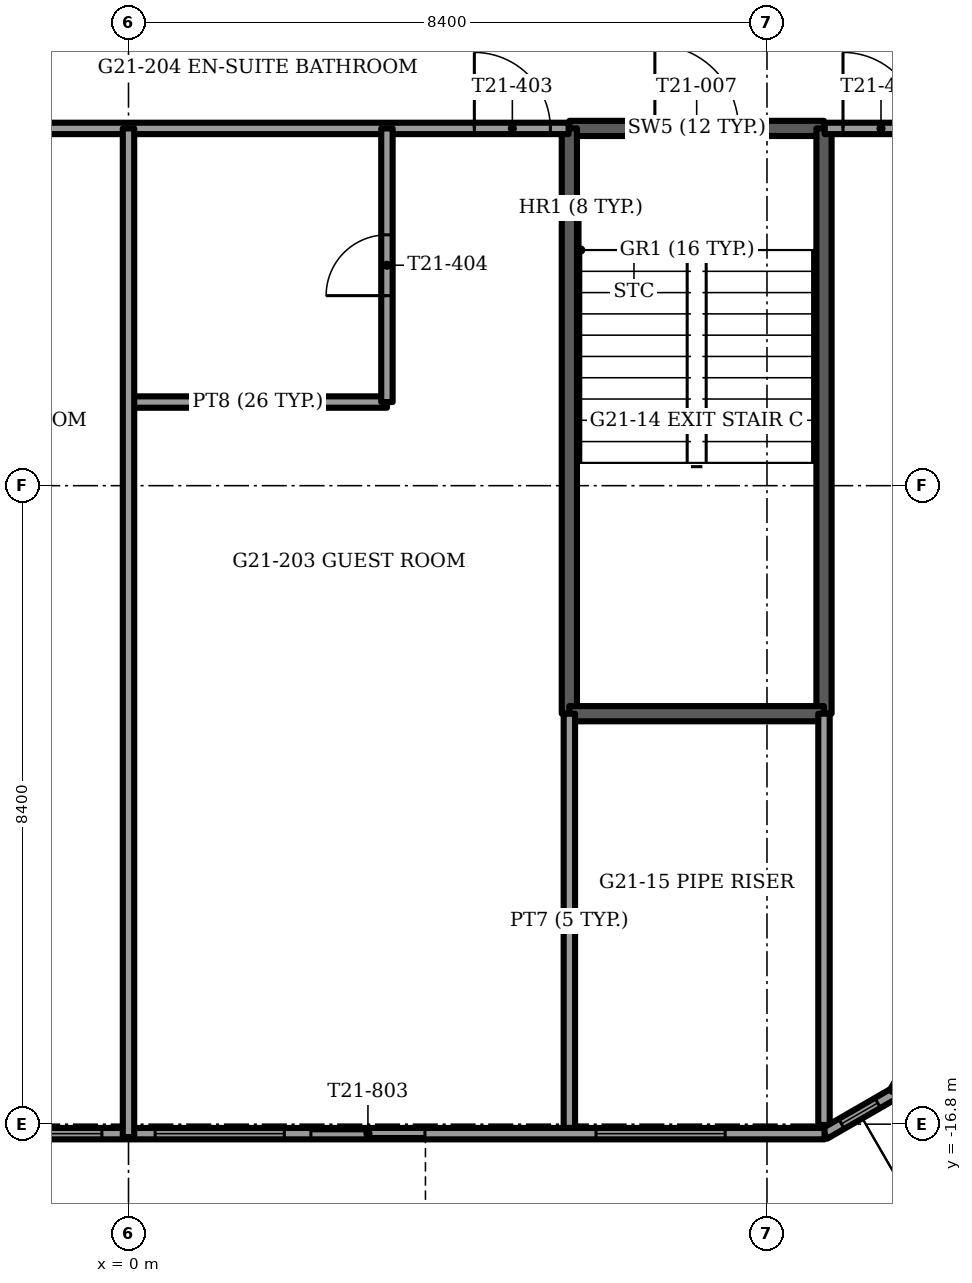
"""IFC4 building model, lengths in metres.
Left out: names, types, materials, properties, quantities, classifications, styles, units other than length and angle.
Written with IfcOpenShell. Run it as: python <this file> out.ifc"""

import sys

from ifc_helpers import new_model, si_unit, direction, frame, frame_2d, origin, place, context, subcontext, project, spatial, rectangle, extrude, element, fill, save


model = new_model("IFC4")
c1 = context("Model", 3, precision=1e-05, world=origin(), true_north=direction((0.0, 1.0)))
c2 = subcontext(c1, "Body", "Model", "MODEL_VIEW")
j1 = project(units=[si_unit("LENGTHUNIT", "METRE"), si_unit("PLANEANGLEUNIT", "RADIAN")], contexts=[c1])
p1 = place(None, origin())
s1 = spatial("IfcSite", under=j1, at=p1, CompositionType="ELEMENT")
p2 = place(p1, origin())
s2 = spatial("IfcBuilding", under=s1, at=p2, CompositionType="ELEMENT")
p3 = place(p2, frame((0.0, 0.0, 85.5)))
s3 = spatial("IfcBuildingStorey", under=s2, at=p3, CompositionType="ELEMENT", Elevation=85.5)
p4 = place(p3, frame((-9.157, -16.925, 0.0), z_axis=(0.0, 0.0, 1.0), x_axis=(1.0, 0.0, 0.0)))
e1 = element("IfcWall", 1, at=p4, inside=s3, PredefinedType="SOLIDWALL", context=c2, shape_type="SweptSolid", body=[
    extrude(rectangle(XDim=18.313, YDim=0.15, at=frame_2d((9.157, 0.0))), origin(), (0.0, 0.0, 1.0), 3.45),
])
p5 = place(p4, frame((3.707, 0.0, 0.15)))
e2 = element("IfcOpeningElement", 2, at=p5, cuts=e1, PredefinedType="OPENING", context=c2, shape_type="SweptSolid", body=[
    extrude(rectangle(XDim=0.9, YDim=2.85, at=frame_2d((0.45, 1.425))), frame((0.0, 0.075, 0.0), z_axis=(0.0, -1.0, 0.0), x_axis=(1.0, 0.0, 0.0)), (0.0, 0.0, 1.0), 0.15),
])
p6 = place(p4, frame((1.507, 0.0, 0.15)))
e3 = element("IfcOpeningElement", 3, at=p6, cuts=e1, PredefinedType="OPENING", context=c2, shape_type="SweptSolid", body=[
    extrude(rectangle(XDim=1.5, YDim=2.85, at=frame_2d((0.75, 1.425))), frame((0.0, 0.075, 0.0), z_axis=(0.0, -1.0, 0.0), x_axis=(1.0, 0.0, 0.0)), (0.0, 0.0, 1.0), 0.15),
])
p7 = place(p4, frame((5.257, 0.0, 0.15)))
e4 = element("IfcOpeningElement", 4, at=p7, cuts=e1, PredefinedType="OPENING", context=c2, shape_type="SweptSolid", body=[
    extrude(rectangle(XDim=1.7, YDim=2.85, at=frame_2d((0.85, 1.425))), frame((0.0, 0.075, 0.0), z_axis=(0.0, -1.0, 0.0), x_axis=(1.0, 0.0, 0.0)), (0.0, 0.0, 1.0), 0.15),
])
p8 = place(p4, frame((7.307, 0.0, 0.15)))
e5 = element("IfcOpeningElement", 5, at=p8, cuts=e1, PredefinedType="OPENING", context=c2, shape_type="SweptSolid", body=[
    extrude(rectangle(XDim=1.5, YDim=2.85, at=frame_2d((0.75, 1.425))), frame((0.0, 0.075, 0.0), z_axis=(0.0, -1.0, 0.0), x_axis=(1.0, 0.0, 0.0)), (0.0, 0.0, 1.0), 0.15),
])
p9 = place(p4, frame((9.507, 0.0, 0.15)))
e6 = element("IfcOpeningElement", 6, at=p9, cuts=e1, PredefinedType="OPENING", context=c2, shape_type="SweptSolid", body=[
    extrude(rectangle(XDim=1.7, YDim=2.85, at=frame_2d((0.85, 1.425))), frame((0.0, 0.075, 0.0), z_axis=(0.0, -1.0, 0.0), x_axis=(1.0, 0.0, 0.0)), (0.0, 0.0, 1.0), 0.15),
])
p10 = place(p4, frame((11.557, 0.0, 0.0)))
e7 = element("IfcOpeningElement", 7, at=p10, cuts=e1, PredefinedType="OPENING", context=c2, shape_type="SweptSolid", body=[
    extrude(rectangle(XDim=1.5, YDim=2.4, at=frame_2d((0.75, 1.2))), frame((0.0, 0.075, 0.0), z_axis=(0.0, -1.0, 0.0), x_axis=(1.0, 0.0, 0.0)), (0.0, 0.0, 1.0), 0.15),
])
p11 = place(p4, frame((15.307, 0.0, 0.15)))
e8 = element("IfcOpeningElement", 8, at=p11, cuts=e1, PredefinedType="OPENING", context=c2, shape_type="SweptSolid", body=[
    extrude(rectangle(XDim=1.7, YDim=2.85, at=frame_2d((0.85, 1.425))), frame((0.0, 0.075, 0.0), z_axis=(0.0, -1.0, 0.0), x_axis=(1.0, 0.0, 0.0)), (0.0, 0.0, 1.0), 0.15),
])
p12 = place(p3, frame((10.079, -16.393, 0.0), z_axis=(0.0, 0.0, 1.0), x_axis=(0.499995945303, 0.866027744752, 0.0)))
e9 = element("IfcWall", 9, at=p12, inside=s3, PredefinedType="SOLIDWALL", context=c2, shape_type="SweptSolid", body=[
    extrude(rectangle(XDim=18.314, YDim=0.15, at=frame_2d((9.157, 0.0))), origin(), (0.0, 0.0, 1.0), 3.45),
])
p13 = place(p12, frame((3.157, 0.0, 0.15)))
e10 = element("IfcOpeningElement", 10, at=p13, cuts=e9, PredefinedType="OPENING", context=c2, shape_type="SweptSolid", body=[
    extrude(rectangle(XDim=1.7, YDim=2.85, at=frame_2d((0.85, 1.425))), frame((0.0, 0.075, 0.0), z_axis=(0.0, -1.0, 0.0), x_axis=(1.0, 0.0, 0.0)), (0.0, 0.0, 1.0), 0.15),
])
p14 = place(p12, frame((5.257, 0.0, 0.0)))
e11 = element("IfcOpeningElement", 11, at=p14, cuts=e9, PredefinedType="OPENING", context=c2, shape_type="SweptSolid", body=[
    extrude(rectangle(XDim=1.5, YDim=2.4, at=frame_2d((0.75, 1.2))), frame((0.0, 0.075, 0.0), z_axis=(0.0, -1.0, 0.0), x_axis=(1.0, 0.0, 0.0)), (0.0, 0.0, 1.0), 0.15),
])
p15 = place(p12, frame((7.357, 0.0, 0.15)))
e12 = element("IfcOpeningElement", 12, at=p15, cuts=e9, PredefinedType="OPENING", context=c2, shape_type="SweptSolid", body=[
    extrude(rectangle(XDim=1.7, YDim=2.85, at=frame_2d((0.85, 1.425))), frame((0.0, 0.075, 0.0), z_axis=(0.0, -1.0, 0.0), x_axis=(1.0, 0.0, 0.0)), (0.0, 0.0, 1.0), 0.15),
])
p16 = place(p12, frame((9.28, 0.0, 0.0)))
e13 = element("IfcOpeningElement", 13, at=p16, cuts=e9, PredefinedType="OPENING", context=c2, shape_type="SweptSolid", body=[
    extrude(rectangle(XDim=1.5, YDim=2.4, at=frame_2d((0.75, 1.2))), frame((0.0, 0.075, 0.0), z_axis=(0.0, -1.0, 0.0), x_axis=(1.0, 0.0, 0.0)), (0.0, 0.0, 1.0), 0.15),
])
p17 = place(p12, frame((12.832, 0.0, 0.15)))
e14 = element("IfcOpeningElement", 14, at=p17, cuts=e9, PredefinedType="OPENING", context=c2, shape_type="SweptSolid", body=[
    extrude(rectangle(XDim=1.5, YDim=2.85, at=frame_2d((0.75, 1.425))), frame((0.0, 0.075, 0.0), z_axis=(0.0, -1.0, 0.0), x_axis=(1.0, 0.0, 0.0)), (0.0, 0.0, 1.0), 0.15),
])
p18 = place(p12, frame((0.528, 0.0, 0.15)))
e15 = element("IfcOpeningElement", 15, at=p18, cuts=e9, PredefinedType="OPENING", context=c2, shape_type="SweptSolid", body=[
    extrude(rectangle(XDim=1.7, YDim=2.73, at=frame_2d((0.85, 1.365))), frame((0.0, 0.075, 0.0), z_axis=(0.0, -1.0, 0.0), x_axis=(1.0, 0.0, 0.0)), (0.0, 0.0, 1.0), 0.15),
])
p19 = place(p12, frame((15.782, 0.0, 0.15)))
e16 = element("IfcOpeningElement", 16, at=p19, cuts=e9, PredefinedType="OPENING", context=c2, shape_type="SweptSolid", body=[
    extrude(rectangle(XDim=0.9, YDim=2.73, at=frame_2d((0.45, 1.365))), frame((0.0, 0.075, 0.0), z_axis=(0.0, -1.0, 0.0), x_axis=(1.0, 0.0, 0.0)), (0.0, 0.0, 1.0), 0.15),
])
p20 = place(p3, frame((9.157, -16.925, 0.0), z_axis=(0.0, 0.0, 1.0), x_axis=(0.866048165231, 0.499960573946, 0.0)))
e17 = element("IfcWall", 17, at=p20, inside=s3, PredefinedType="SOLIDWALL", context=c2, shape_type="SweptSolid", body=[
    extrude(rectangle(XDim=1.065, YDim=0.15, at=frame_2d((0.532, 0.0))), origin(), (0.0, 0.0, 1.0), 3.45),
])
p21 = place(p20, frame((0.258, 0.0, 0.15)))
e18 = element("IfcOpeningElement", 18, at=p21, cuts=e17, PredefinedType="OPENING", context=c2, shape_type="SweptSolid", body=[
    extrude(rectangle(XDim=0.55, YDim=2.85, at=frame_2d((0.275, 1.425))), frame((0.0, 0.075, 0.0), z_axis=(0.0, -1.0, 0.0), x_axis=(1.0, 0.0, 0.0)), (0.0, 0.0, 1.0), 0.15),
])
p22 = place(p3, frame((5.8, -3.7, -0.3), z_axis=(0.0, 0.0, 1.0), x_axis=(1.0, 0.0, 0.0)))
e19 = element("IfcWall", 19, at=p22, inside=s3, PredefinedType="SOLIDWALL", context=c2, shape_type="SweptSolid", body=[
    extrude(rectangle(XDim=3.35, YDim=0.2, at=frame_2d((1.675, 0.0))), origin(), (0.0, 0.0, 1.0), 3.75),
])
p23 = place(p22, frame((1.125, 0.0, 0.0)))
e20 = element("IfcOpeningElement", 20, at=p23, cuts=e19, PredefinedType="OPENING", context=c2, shape_type="SweptSolid", body=[
    extrude(rectangle(XDim=1.1, YDim=2.1, at=frame_2d((0.55, 1.05))), frame((0.0, 0.1, 0.0), z_axis=(0.0, -1.0, 0.0), x_axis=(1.0, 0.0, 0.0)), (0.0, 0.0, 1.0), 0.2),
])
for number, where, z_axis, x_axis in (
    (21, (5.8, -3.7, -0.3), (0.0, 0.0, 1.0), (0.0, -1.0, 0.0)),
    (22, (9.15, -3.7, -0.3), (0.0, 0.0, 1.0), (0.0, -1.0, 0.0)),
):
    element("IfcWall", number, at=place(p3, frame(where, z_axis=z_axis, x_axis=x_axis)), inside=s3, PredefinedType="SOLIDWALL", context=c2, shape_type="SweptSolid", body=[
        extrude(rectangle(XDim=7.7, YDim=0.2, at=frame_2d((3.85, 0.0))), origin(), (0.0, 0.0, 1.0), 3.75),
    ])
p24 = place(p3, frame((5.8, -11.4, -0.3), z_axis=(0.0, 0.0, 1.0), x_axis=(1.0, 0.0, 0.0)))
e23 = element("IfcWall", 23, at=p24, inside=s3, PredefinedType="SOLIDWALL", context=c2, shape_type="SweptSolid", body=[
    extrude(rectangle(XDim=3.35, YDim=0.2, at=frame_2d((1.675, 0.0))), origin(), (0.0, 0.0, 1.0), 3.75),
])
p25 = place(p3, frame((5.8, -11.4, 0.0), z_axis=(0.0, 0.0, 1.0), x_axis=(0.0, -1.0, 0.0)))
e24 = element("IfcWall", 24, at=p25, inside=s3, PredefinedType="PARTITIONING", context=c2, shape_type="SweptSolid", body=[
    extrude(rectangle(XDim=5.45, YDim=0.15, at=frame_2d((2.725, 0.0))), origin(), (0.0, 0.0, 1.0), 3.45),
])
p26 = place(p3, frame((9.15, -11.4, 0.0), z_axis=(0.0, 0.0, 1.0), x_axis=(0.0, -1.0, 0.0)))
e25 = element("IfcWall", 25, at=p26, inside=s3, PredefinedType="PARTITIONING", context=c2, shape_type="SweptSolid", body=[
    extrude(rectangle(XDim=5.411, YDim=0.15, at=frame_2d((2.706, 0.0))), origin(), (0.0, 0.0, 1.0), 3.45),
])
p27 = place(p3, frame((0.0, -7.3, 0.0), z_axis=(0.0, 0.0, 1.0), x_axis=(1.0, 0.0, 0.0)))
e26 = element("IfcWall", 26, at=p27, inside=s3, PredefinedType="PARTITIONING", context=c2, shape_type="SweptSolid", body=[
    extrude(rectangle(XDim=3.4, YDim=0.15, at=frame_2d((1.7, 0.0))), origin(), (0.0, 0.0, 1.0), 3.45),
])
p28 = place(p3, frame((-5.79, -3.7, 0.0), z_axis=(0.0, 0.0, 1.0), x_axis=(1.0, 0.0, 0.0)))
e27 = element("IfcWall", 27, at=p28, inside=s3, PredefinedType="PARTITIONING", context=c2, shape_type="SweptSolid", body=[
    extrude(rectangle(XDim=11.58, YDim=0.15, at=frame_2d((5.79, 0.0))), origin(), (0.0, 0.0, 1.0), 3.45),
])
p29 = place(p28, frame((2.39, 0.0, 0.0)))
e28 = element("IfcOpeningElement", 28, at=p29, cuts=e27, PredefinedType="OPENING", context=c2, shape_type="SweptSolid", body=[
    extrude(rectangle(XDim=1.0, YDim=2.1, at=frame_2d((0.5, 1.05))), frame((0.0, 0.075, 0.0), z_axis=(0.0, -1.0, 0.0), x_axis=(1.0, 0.0, 0.0)), (0.0, 0.0, 1.0), 0.15),
])
p30 = place(p28, frame((10.34, 0.0, 0.0)))
e29 = element("IfcOpeningElement", 29, at=p30, cuts=e27, PredefinedType="OPENING", context=c2, shape_type="SweptSolid", body=[
    extrude(rectangle(XDim=1.0, YDim=2.1, at=frame_2d((0.5, 1.05))), frame((0.0, 0.075, 0.0), z_axis=(0.0, -1.0, 0.0), x_axis=(1.0, 0.0, 0.0)), (0.0, 0.0, 1.0), 0.15),
])
p31 = place(p3, frame((9.16, -3.7, 0.0), z_axis=(0.0, 0.0, 1.0), x_axis=(1.0, 0.0, 0.0)))
e30 = element("IfcWall", 30, at=p31, inside=s3, PredefinedType="PARTITIONING", context=c2, shape_type="SweptSolid", body=[
    extrude(rectangle(XDim=8.299, YDim=0.15, at=frame_2d((4.149, 0.0))), origin(), (0.0, 0.0, 1.0), 3.45),
])
p32 = place(p31, frame((0.24, 0.0, 0.0)))
e31 = element("IfcOpeningElement", 31, at=p32, cuts=e30, PredefinedType="OPENING", context=c2, shape_type="SweptSolid", body=[
    extrude(rectangle(XDim=1.0, YDim=2.1, at=frame_2d((0.5, 1.05))), frame((0.0, 0.075, 0.0), z_axis=(0.0, -1.0, 0.0), x_axis=(1.0, 0.0, 0.0)), (0.0, 0.0, 1.0), 0.15),
])
p33 = place(p3, frame((3.4, -7.3, 0.0), z_axis=(0.0, 0.0, 1.0), x_axis=(0.0, 1.0, 0.0)))
e32 = element("IfcWall", 32, at=p33, inside=s3, PredefinedType="PARTITIONING", context=c2, shape_type="SweptSolid", body=[
    extrude(rectangle(XDim=3.6, YDim=0.15, at=frame_2d((1.8, 0.0))), origin(), (0.0, 0.0, 1.0), 3.45),
])
p34 = place(p33, frame((1.4, 0.0, 0.0)))
e33 = element("IfcOpeningElement", 33, at=p34, cuts=e32, PredefinedType="OPENING", context=c2, shape_type="SweptSolid", body=[
    extrude(rectangle(XDim=0.8, YDim=2.1, at=frame_2d((0.4, 1.05))), frame((0.0, 0.075, 0.0), z_axis=(0.0, -1.0, 0.0), x_axis=(1.0, 0.0, 0.0)), (0.0, 0.0, 1.0), 0.15),
])
p35 = place(p3, frame((0.0, -16.97, 0.0), z_axis=(0.0, 0.0, 1.0), x_axis=(0.0, 1.0, 0.0)))
e34 = element("IfcWall", 34, at=p35, inside=s3, PredefinedType="PARTITIONING", context=c2, shape_type="SweptSolid", body=[
    extrude(rectangle(XDim=13.27, YDim=0.15, at=frame_2d((6.635, 0.0))), origin(), (0.0, 0.0, 1.0), 3.45),
])
p36 = place(p8, origin())
e35 = element("IfcWindow", 35, at=p36, inside=s3, PartitioningType="SINGLE_PANEL", PredefinedType="WINDOW", context=c2, shape_type="SweptSolid", body=[
    extrude(rectangle(XDim=1.5, YDim=2.85, at=frame_2d((0.75, 1.425))), frame((0.0, 0.03, 0.0), z_axis=(0.0, -1.0, 0.0), x_axis=(1.0, 0.0, 0.0)), (0.0, 0.0, 1.0), 0.06),
])
fill(e5, e35)
p37 = place(p9, origin())
e36 = element("IfcWindow", 36, at=p37, inside=s3, PartitioningType="SINGLE_PANEL", PredefinedType="WINDOW", context=c2, shape_type="SweptSolid", body=[
    extrude(rectangle(XDim=1.7, YDim=2.85, at=frame_2d((0.85, 1.425))), frame((0.0, 0.03, 0.0), z_axis=(0.0, -1.0, 0.0), x_axis=(1.0, 0.0, 0.0)), (0.0, 0.0, 1.0), 0.06),
])
fill(e6, e36)
p38 = place(p10, origin())
e37 = element("IfcDoor", 37, at=p38, inside=s3, OperationType="SLIDING_TO_LEFT", PredefinedType="DOOR", context=c2, shape_type="SweptSolid", body=[
    extrude(rectangle(XDim=1.5, YDim=2.4, at=frame_2d((0.75, 1.2))), frame((0.0, 0.025, 0.0), z_axis=(0.0, -1.0, 0.0), x_axis=(1.0, 0.0, 0.0)), (0.0, 0.0, 1.0), 0.05),
])
fill(e7, e37)
p39 = place(p11, origin())
e38 = element("IfcWindow", 38, at=p39, inside=s3, PartitioningType="SINGLE_PANEL", PredefinedType="WINDOW", context=c2, shape_type="SweptSolid", body=[
    extrude(rectangle(XDim=1.7, YDim=2.85, at=frame_2d((0.85, 1.425))), frame((0.0, 0.03, 0.0), z_axis=(0.0, -1.0, 0.0), x_axis=(1.0, 0.0, 0.0)), (0.0, 0.0, 1.0), 0.06),
])
fill(e8, e38)
p40 = place(p21, origin())
e39 = element("IfcWindow", 39, at=p40, inside=s3, PartitioningType="SINGLE_PANEL", PredefinedType="WINDOW", context=c2, shape_type="SweptSolid", body=[
    extrude(rectangle(XDim=0.55, YDim=2.85, at=frame_2d((0.275, 1.425))), frame((0.0, 0.03, 0.0), z_axis=(0.0, -1.0, 0.0), x_axis=(1.0, 0.0, 0.0)), (0.0, 0.0, 1.0), 0.06),
])
fill(e18, e39)
p41 = place(p23, origin())
e40 = element("IfcDoor", 40, at=p41, inside=s3, OperationType="SINGLE_SWING_LEFT", PredefinedType="DOOR", context=c2, shape_type="SweptSolid", body=[
    extrude(rectangle(XDim=1.1, YDim=2.1, at=frame_2d((0.55, 1.05))), frame((0.0, 0.025, 0.0), z_axis=(0.0, -1.0, 0.0), x_axis=(1.0, 0.0, 0.0)), (0.0, 0.0, 1.0), 0.05),
])
fill(e20, e40)
p42 = place(p30, origin())
e41 = element("IfcDoor", 41, at=p42, inside=s3, OperationType="SINGLE_SWING_RIGHT", PredefinedType="DOOR", context=c2, shape_type="SweptSolid", body=[
    extrude(rectangle(XDim=1.0, YDim=2.1, at=frame_2d((0.5, 1.05))), frame((0.0, 0.025, 0.0), z_axis=(0.0, -1.0, 0.0), x_axis=(1.0, 0.0, 0.0)), (0.0, 0.0, 1.0), 0.05),
])
fill(e29, e41)
p43 = place(p34, origin())
e42 = element("IfcDoor", 42, at=p43, inside=s3, OperationType="SINGLE_SWING_RIGHT", PredefinedType="DOOR", context=c2, shape_type="SweptSolid", body=[
    extrude(rectangle(XDim=0.8, YDim=2.1, at=frame_2d((0.4, 1.05))), frame((0.0, 0.025, 0.0), z_axis=(0.0, -1.0, 0.0), x_axis=(1.0, 0.0, 0.0)), (0.0, 0.0, 1.0), 0.05),
])
fill(e33, e42)
p44 = place(p32, origin())
e43 = element("IfcDoor", 43, at=p44, inside=s3, OperationType="SINGLE_SWING_LEFT", PredefinedType="DOOR", context=c2, shape_type="SweptSolid", body=[
    extrude(rectangle(XDim=1.0, YDim=2.1, at=frame_2d((0.5, 1.05))), frame((0.0, 0.025, 0.0), z_axis=(0.0, -1.0, 0.0), x_axis=(1.0, 0.0, 0.0)), (0.0, 0.0, 1.0), 0.05),
])
fill(e31, e43)
save(model, sys.argv[1])
